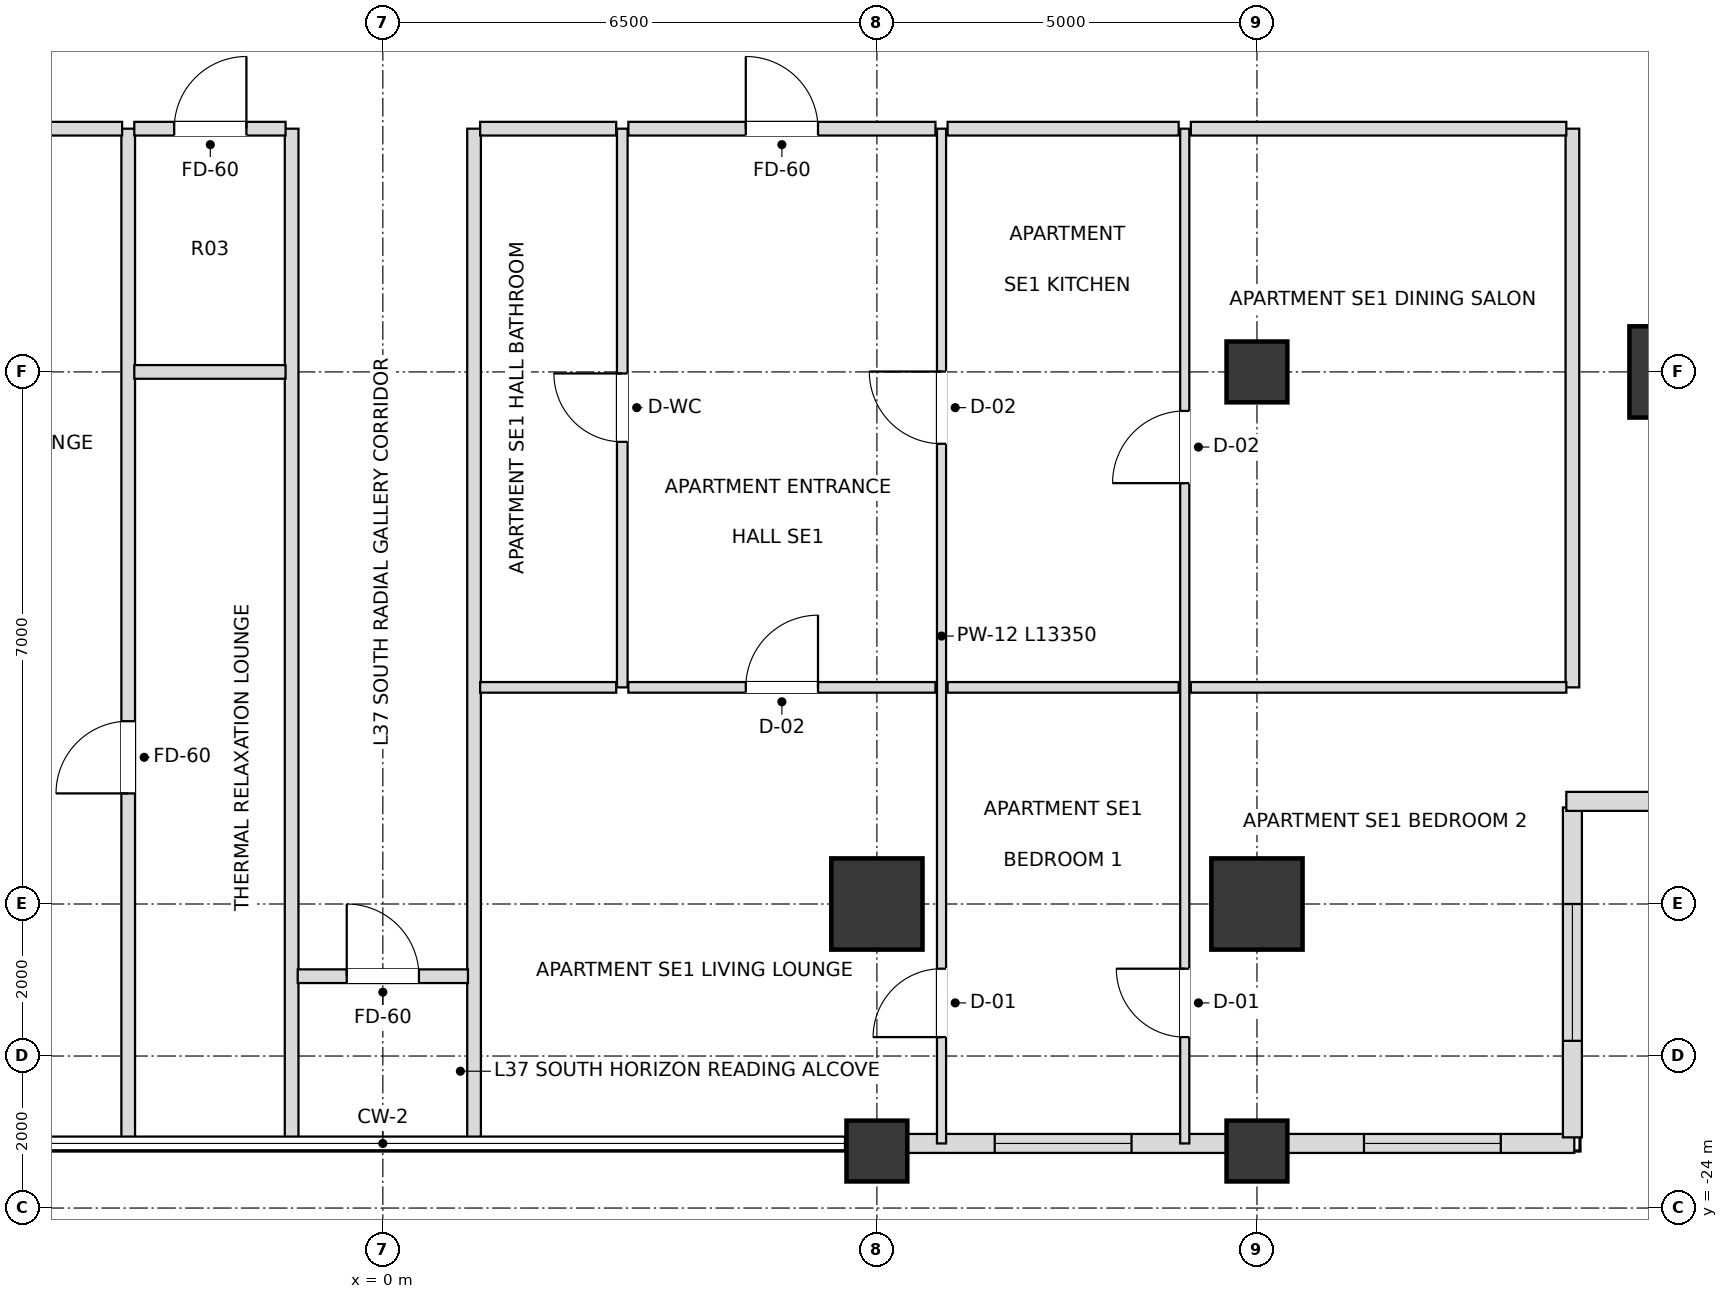
"""IFC4 building model, lengths in metres.
Left out: names, types, materials, properties, quantities, classifications, styles, units other than length and angle.
Written with IfcOpenShell. Run it as: python <this file> out.ifc"""

import sys

from ifc_helpers import new_model, si_unit, direction, frame, frame_2d, origin, origin_2d, place, context, subcontext, project, spatial, rectangle, extrude, element, fill, save


model = new_model("IFC4")
c1 = context("Model", 3, precision=1e-05, world=origin(), true_north=direction((0.0, 1.0)))
c2 = subcontext(c1, "Body", "Model", "MODEL_VIEW")
j1 = project(units=[si_unit("LENGTHUNIT", "METRE"), si_unit("PLANEANGLEUNIT", "RADIAN")], contexts=[c1])
p1 = place(None, origin())
s1 = spatial("IfcSite", under=j1, at=p1, CompositionType="ELEMENT")
p2 = place(p1, origin())
s2 = spatial("IfcBuilding", under=s1, at=p2, CompositionType="ELEMENT")
p3 = place(p2, frame((0.0, 0.0, 147.6)))
s3 = spatial("IfcBuildingStorey", under=s2, at=p3, CompositionType="ELEMENT", Elevation=147.6)
for number, where, z_axis, x_axis in (
    (1, (6.5, -20.0, 0.0), (0.0, 0.0, 1.0), (1.0, 0.0, 0.0)),
    (2, (11.5, -20.0, 0.0), (0.0, 0.0, 1.0), (1.0, 0.0, 0.0)),
    (3, (17.0, -13.0, 0.0), (0.0, 0.0, 1.0), (1.0, 0.0, 0.0)),
):
    element("IfcColumn", number, at=place(p3, frame(where, z_axis=z_axis, x_axis=x_axis)), inside=s3, PredefinedType="USERDEFINED", context=c2, shape_type="SweptSolid", body=[
        extrude(rectangle(XDim=1.2, YDim=1.2, at=origin_2d()), origin(), (0.0, 0.0, 1.0), 3.6),
    ])
for number, where, z_axis, x_axis in (
    (4, (11.5, -13.0, 0.0), (0.0, 0.0, 1.0), (1.0, 0.0, 0.0)),
    (5, (6.5, -23.25, 0.0), (0.0, 0.0, 1.0), (1.0, 0.0, 0.0)),
    (6, (11.5, -23.25, 0.0), (0.0, 0.0, 1.0), (1.0, 0.0, 0.0)),
):
    element("IfcColumn", number, at=place(p3, frame(where, z_axis=z_axis, x_axis=x_axis)), inside=s3, PredefinedType="COLUMN", context=c2, shape_type="SweptSolid", body=[
        extrude(rectangle(XDim=0.8, YDim=0.8, at=origin_2d()), origin(), (0.0, 0.0, 1.0), 3.6),
    ])
p4 = place(p3, frame((6.895, -23.15, 0.0), z_axis=(0.0, 0.0, 1.0), x_axis=(1.0, 0.0, 0.0)))
e7 = element("IfcWall", 7, at=p4, inside=s3, PredefinedType="SOLIDWALL", context=c2, shape_type="SweptSolid", body=[
    extrude(rectangle(XDim=4.21, YDim=0.25, at=frame_2d((2.105, 0.0))), origin(), (0.0, 0.0, 1.0), 2.736),
])
p5 = place(p4, frame((1.155, 0.0, 0.72)))
e8 = element("IfcOpeningElement", 8, at=p5, cuts=e7, PredefinedType="OPENING", context=c2, shape_type="SweptSolid", body=[
    extrude(rectangle(XDim=1.8, YDim=1.68, at=frame_2d((0.9, 0.84))), frame((0.0, 0.135, 0.0), z_axis=(0.0, -1.0, 0.0), x_axis=(1.0, 0.0, 0.0)), (0.0, 0.0, 1.0), 0.27),
])
p6 = place(p3, frame((11.895, -23.15, 0.0), z_axis=(0.0, 0.0, 1.0), x_axis=(1.0, 0.0, 0.0)))
e9 = element("IfcWall", 9, at=p6, inside=s3, PredefinedType="SOLIDWALL", context=c2, shape_type="SweptSolid", body=[
    extrude(rectangle(XDim=3.78, YDim=0.25, at=frame_2d((1.89, 0.0))), origin(), (0.0, 0.0, 1.0), 2.736),
])
p7 = place(p6, frame((1.013, 0.0, 0.72)))
e10 = element("IfcOpeningElement", 10, at=p7, cuts=e9, PredefinedType="OPENING", context=c2, shape_type="SweptSolid", body=[
    extrude(rectangle(XDim=1.8, YDim=1.68, at=frame_2d((0.9, 0.84))), frame((0.0, 0.135, 0.0), z_axis=(0.0, -1.0, 0.0), x_axis=(1.0, 0.0, 0.0)), (0.0, 0.0, 1.0), 0.27),
])
p8 = place(p3, frame((15.65, -23.07, 0.0), z_axis=(0.0, 0.0, 1.0), x_axis=(0.0, 1.0, 0.0)))
e11 = element("IfcWall", 11, at=p8, inside=s3, PredefinedType="SOLIDWALL", context=c2, shape_type="SweptSolid", body=[
    extrude(rectangle(XDim=4.34, YDim=0.25, at=frame_2d((2.17, 0.0))), origin(), (0.0, 0.0, 1.0), 2.736),
])
p9 = place(p8, frame((1.27, 0.0, 0.72)))
e12 = element("IfcOpeningElement", 12, at=p9, cuts=e11, PredefinedType="OPENING", context=c2, shape_type="SweptSolid", body=[
    extrude(rectangle(XDim=1.8, YDim=1.68, at=frame_2d((0.9, 0.84))), frame((0.0, 0.135, 0.0), z_axis=(0.0, -1.0, 0.0), x_axis=(1.0, 0.0, 0.0)), (0.0, 0.0, 1.0), 0.27),
])
p10 = place(p3, frame((15.57, -18.65, 0.0), z_axis=(0.0, 0.0, 1.0), x_axis=(1.0, 0.0, 0.0)))
e13 = element("IfcWall", 13, at=p10, inside=s3, PredefinedType="SOLIDWALL", context=c2, shape_type="SweptSolid", body=[
    extrude(rectangle(XDim=4.66, YDim=0.25, at=frame_2d((2.33, 0.0))), origin(), (0.0, 0.0, 1.0), 2.736),
])
p11 = place(p10, frame((1.43, 0.0, 0.72)))
e14 = element("IfcOpeningElement", 14, at=p11, cuts=e13, PredefinedType="OPENING", context=c2, shape_type="SweptSolid", body=[
    extrude(rectangle(XDim=1.8, YDim=1.68, at=frame_2d((0.9, 0.84))), frame((0.0, 0.135, 0.0), z_axis=(0.0, -1.0, 0.0), x_axis=(1.0, 0.0, 0.0)), (0.0, 0.0, 1.0), 0.27),
])
p12 = place(p3, frame((-3.35, -23.15, 0.0), z_axis=(0.0, 0.0, 1.0), x_axis=(0.0, 1.0, 0.0)))
e15 = element("IfcWall", 15, at=p12, inside=s3, PredefinedType="PARTITIONING", context=c2, shape_type="SweptSolid", body=[
    extrude(rectangle(XDim=13.35, YDim=0.18, at=frame_2d((6.675, 0.0))), origin(), (0.0, 0.0, 1.0), 2.816),
])
p13 = place(p12, frame((4.605, 0.0, 0.0)))
e16 = element("IfcOpeningElement", 16, at=p13, cuts=e15, PredefinedType="OPENING", context=c2, shape_type="SweptSolid", body=[
    extrude(rectangle(XDim=0.95, YDim=2.15, at=frame_2d((0.475, 1.075))), frame((0.0, 0.1, 0.0), z_axis=(0.0, -1.0, 0.0), x_axis=(1.0, 0.0, 0.0)), (0.0, 0.0, 1.0), 0.2),
])
for number, where, z_axis, x_axis in (
    (17, (-1.2, -23.15, 0.0), (0.0, 0.0, 1.0), (0.0, 1.0, 0.0)),
    (18, (1.2, -23.15, 0.0), (0.0, 0.0, 1.0), (0.0, 1.0, 0.0)),
):
    element("IfcWall", number, at=place(p3, frame(where, z_axis=z_axis, x_axis=x_axis)), inside=s3, PredefinedType="PARTITIONING", context=c2, shape_type="SweptSolid", body=[
        extrude(rectangle(XDim=13.35, YDim=0.18, at=frame_2d((6.675, 0.0))), origin(), (0.0, 0.0, 1.0), 2.816),
    ])
p14 = place(p3, frame((3.15, -17.15, 0.0), z_axis=(0.0, 0.0, 1.0), x_axis=(0.0, 1.0, 0.0)))
e19 = element("IfcWall", 19, at=p14, inside=s3, PredefinedType="PARTITIONING", context=c2, shape_type="SweptSolid", body=[
    extrude(rectangle(XDim=7.35, YDim=0.14, at=frame_2d((3.675, 0.0))), origin(), (0.0, 0.0, 1.0), 3.38),
])
p15 = place(p14, frame((3.23, 0.0, 0.0)))
e20 = element("IfcOpeningElement", 20, at=p15, cuts=e19, PredefinedType="OPENING", context=c2, shape_type="SweptSolid", body=[
    extrude(rectangle(XDim=0.9, YDim=2.1, at=frame_2d((0.45, 1.05))), frame((0.0, 0.08, 0.0), z_axis=(0.0, -1.0, 0.0), x_axis=(1.0, 0.0, 0.0)), (0.0, 0.0, 1.0), 0.16),
])
p16 = place(p3, frame((7.35, -23.15, 0.0), z_axis=(0.0, 0.0, 1.0), x_axis=(0.0, 1.0, 0.0)))
e21 = element("IfcWall", 21, at=p16, inside=s3, PredefinedType="PARTITIONING", context=c2, shape_type="SweptSolid", body=[
    extrude(rectangle(XDim=13.35, YDim=0.12, at=frame_2d((6.675, 0.0))), origin(), (0.0, 0.0, 1.0), 2.816),
])
p17 = place(p16, frame((9.205, 0.0, 0.0)))
e22 = element("IfcOpeningElement", 22, at=p17, cuts=e21, PredefinedType="OPENING", context=c2, shape_type="SweptSolid", body=[
    extrude(rectangle(XDim=0.95, YDim=2.1, at=frame_2d((0.475, 1.05))), frame((0.0, 0.07, 0.0), z_axis=(0.0, -1.0, 0.0), x_axis=(1.0, 0.0, 0.0)), (0.0, 0.0, 1.0), 0.14),
])
p18 = place(p16, frame((1.399, 0.0, 0.0)))
e23 = element("IfcOpeningElement", 23, at=p18, cuts=e21, PredefinedType="OPENING", context=c2, shape_type="SweptSolid", body=[
    extrude(rectangle(XDim=0.9, YDim=2.1, at=frame_2d((0.45, 1.05))), frame((0.0, 0.07, 0.0), z_axis=(0.0, -1.0, 0.0), x_axis=(1.0, 0.0, 0.0)), (0.0, 0.0, 1.0), 0.14),
])
p19 = place(p3, frame((10.55, -23.15, 0.0), z_axis=(0.0, 0.0, 1.0), x_axis=(0.0, 1.0, 0.0)))
e24 = element("IfcWall", 24, at=p19, inside=s3, PredefinedType="PARTITIONING", context=c2, shape_type="SweptSolid", body=[
    extrude(rectangle(XDim=13.35, YDim=0.12, at=frame_2d((6.675, 0.0))), origin(), (0.0, 0.0, 1.0), 2.816),
])
p20 = place(p19, frame((8.687, 0.0, 0.0)))
e25 = element("IfcOpeningElement", 25, at=p20, cuts=e24, PredefinedType="OPENING", context=c2, shape_type="SweptSolid", body=[
    extrude(rectangle(XDim=0.95, YDim=2.1, at=frame_2d((0.475, 1.05))), frame((0.0, 0.07, 0.0), z_axis=(0.0, -1.0, 0.0), x_axis=(1.0, 0.0, 0.0)), (0.0, 0.0, 1.0), 0.14),
])
p21 = place(p19, frame((1.399, 0.0, 0.0)))
e26 = element("IfcOpeningElement", 26, at=p21, cuts=e24, PredefinedType="OPENING", context=c2, shape_type="SweptSolid", body=[
    extrude(rectangle(XDim=0.9, YDim=2.1, at=frame_2d((0.45, 1.05))), frame((0.0, 0.07, 0.0), z_axis=(0.0, -1.0, 0.0), x_axis=(1.0, 0.0, 0.0)), (0.0, 0.0, 1.0), 0.14),
])
p22 = place(p3, frame((15.65, -17.15, 0.0), z_axis=(0.0, 0.0, 1.0), x_axis=(0.0, 1.0, 0.0)))
e27 = element("IfcWall", 27, at=p22, inside=s3, PredefinedType="PARTITIONING", context=c2, shape_type="SweptSolid", body=[
    extrude(rectangle(XDim=7.35, YDim=0.18, at=frame_2d((3.675, 0.0))), origin(), (0.0, 0.0, 1.0), 2.736),
])
p23 = place(p3, frame((-1.12, -20.95, 0.0), z_axis=(0.0, 0.0, 1.0), x_axis=(1.0, 0.0, 0.0)))
e28 = element("IfcWall", 28, at=p23, inside=s3, PredefinedType="PARTITIONING", context=c2, shape_type="SweptSolid", body=[
    extrude(rectangle(XDim=2.24, YDim=0.18, at=frame_2d((1.12, 0.0))), origin(), (0.0, 0.0, 1.0), 3.38),
])
p24 = place(p23, frame((0.645, 0.0, 0.0)))
e29 = element("IfcOpeningElement", 29, at=p24, cuts=e28, PredefinedType="OPENING", context=c2, shape_type="SweptSolid", body=[
    extrude(rectangle(XDim=0.95, YDim=2.15, at=frame_2d((0.475, 1.075))), frame((0.0, 0.1, 0.0), z_axis=(0.0, -1.0, 0.0), x_axis=(1.0, 0.0, 0.0)), (0.0, 0.0, 1.0), 0.2),
])
p25 = place(p3, frame((1.28, -17.15, 0.0), z_axis=(0.0, 0.0, 1.0), x_axis=(1.0, 0.0, 0.0)))
e30 = element("IfcWall", 30, at=p25, inside=s3, PredefinedType="PARTITIONING", context=c2, shape_type="SweptSolid", body=[
    extrude(rectangle(XDim=1.79, YDim=0.14, at=frame_2d((0.895, 0.0))), origin(), (0.0, 0.0, 1.0), 3.38),
])
p26 = place(p3, frame((3.23, -17.15, 0.0), z_axis=(0.0, 0.0, 1.0), x_axis=(1.0, 0.0, 0.0)))
e31 = element("IfcWall", 31, at=p26, inside=s3, PredefinedType="PARTITIONING", context=c2, shape_type="SweptSolid", body=[
    extrude(rectangle(XDim=4.04, YDim=0.14, at=frame_2d((2.02, 0.0))), origin(), (0.0, 0.0, 1.0), 2.816),
])
p27 = place(p26, frame((1.545, 0.0, 0.0)))
e32 = element("IfcOpeningElement", 32, at=p27, cuts=e31, PredefinedType="OPENING", context=c2, shape_type="SweptSolid", body=[
    extrude(rectangle(XDim=0.95, YDim=2.1, at=frame_2d((0.475, 1.05))), frame((0.0, 0.08, 0.0), z_axis=(0.0, -1.0, 0.0), x_axis=(1.0, 0.0, 0.0)), (0.0, 0.0, 1.0), 0.16),
])
p28 = place(p3, frame((7.43, -17.15, 0.0), z_axis=(0.0, 0.0, 1.0), x_axis=(1.0, 0.0, 0.0)))
e33 = element("IfcWall", 33, at=p28, inside=s3, PredefinedType="PARTITIONING", context=c2, shape_type="SweptSolid", body=[
    extrude(rectangle(XDim=3.04, YDim=0.14, at=frame_2d((1.52, 0.0))), origin(), (0.0, 0.0, 1.0), 3.38),
])
p29 = place(p3, frame((10.63, -17.15, 0.0), z_axis=(0.0, 0.0, 1.0), x_axis=(1.0, 0.0, 0.0)))
e34 = element("IfcWall", 34, at=p29, inside=s3, PredefinedType="PARTITIONING", context=c2, shape_type="SweptSolid", body=[
    extrude(rectangle(XDim=4.94, YDim=0.14, at=frame_2d((2.47, 0.0))), origin(), (0.0, 0.0, 1.0), 2.736),
])
p30 = place(p3, frame((-3.27, -13.0, 0.0), z_axis=(0.0, 0.0, 1.0), x_axis=(1.0, 0.0, 0.0)))
e35 = element("IfcWall", 35, at=p30, inside=s3, PredefinedType="PARTITIONING", context=c2, shape_type="SweptSolid", body=[
    extrude(rectangle(XDim=1.99, YDim=0.18, at=frame_2d((0.995, 0.0))), origin(), (0.0, 0.0, 1.0), 3.38),
])
p31 = place(p3, frame((-10.07, -9.8, 0.0), z_axis=(0.0, 0.0, 1.0), x_axis=(1.0, 0.0, 0.0)))
e36 = element("IfcWall", 36, at=p31, inside=s3, PredefinedType="PARTITIONING", context=c2, shape_type="SweptSolid", body=[
    extrude(rectangle(XDim=6.64, YDim=0.18, at=frame_2d((3.32, 0.0))), origin(), (0.0, 0.0, 1.0), 2.816),
])
p32 = place(p31, frame((2.845, 0.0, 0.0)))
e37 = element("IfcOpeningElement", 37, at=p32, cuts=e36, PredefinedType="OPENING", context=c2, shape_type="SweptSolid", body=[
    extrude(rectangle(XDim=0.95, YDim=2.15, at=frame_2d((0.475, 1.075))), frame((0.0, 0.1, 0.0), z_axis=(0.0, -1.0, 0.0), x_axis=(1.0, 0.0, 0.0)), (0.0, 0.0, 1.0), 0.2),
])
p33 = place(p3, frame((-3.27, -9.8, 0.0), z_axis=(0.0, 0.0, 1.0), x_axis=(1.0, 0.0, 0.0)))
e38 = element("IfcWall", 38, at=p33, inside=s3, PredefinedType="PARTITIONING", context=c2, shape_type="SweptSolid", body=[
    extrude(rectangle(XDim=1.99, YDim=0.18, at=frame_2d((0.995, 0.0))), origin(), (0.0, 0.0, 1.0), 3.38),
])
p34 = place(p33, frame((0.525, 0.0, 0.0)))
e39 = element("IfcOpeningElement", 39, at=p34, cuts=e38, PredefinedType="OPENING", context=c2, shape_type="SweptSolid", body=[
    extrude(rectangle(XDim=0.95, YDim=2.15, at=frame_2d((0.475, 1.075))), frame((0.0, 0.1, 0.0), z_axis=(0.0, -1.0, 0.0), x_axis=(1.0, 0.0, 0.0)), (0.0, 0.0, 1.0), 0.2),
])
p35 = place(p3, frame((1.28, -9.8, 0.0), z_axis=(0.0, 0.0, 1.0), x_axis=(1.0, 0.0, 0.0)))
e40 = element("IfcWall", 40, at=p35, inside=s3, PredefinedType="PARTITIONING", context=c2, shape_type="SweptSolid", body=[
    extrude(rectangle(XDim=1.79, YDim=0.18, at=frame_2d((0.895, 0.0))), origin(), (0.0, 0.0, 1.0), 3.38),
])
p36 = place(p3, frame((3.23, -9.8, 0.0), z_axis=(0.0, 0.0, 1.0), x_axis=(1.0, 0.0, 0.0)))
e41 = element("IfcWall", 41, at=p36, inside=s3, PredefinedType="PARTITIONING", context=c2, shape_type="SweptSolid", body=[
    extrude(rectangle(XDim=4.04, YDim=0.18, at=frame_2d((2.02, 0.0))), origin(), (0.0, 0.0, 1.0), 2.816),
])
p37 = place(p36, frame((1.545, 0.0, 0.0)))
e42 = element("IfcOpeningElement", 42, at=p37, cuts=e41, PredefinedType="OPENING", context=c2, shape_type="SweptSolid", body=[
    extrude(rectangle(XDim=0.95, YDim=2.15, at=frame_2d((0.475, 1.075))), frame((0.0, 0.1, 0.0), z_axis=(0.0, -1.0, 0.0), x_axis=(1.0, 0.0, 0.0)), (0.0, 0.0, 1.0), 0.2),
])
p38 = place(p3, frame((7.43, -9.8, 0.0), z_axis=(0.0, 0.0, 1.0), x_axis=(1.0, 0.0, 0.0)))
e43 = element("IfcWall", 43, at=p38, inside=s3, PredefinedType="PARTITIONING", context=c2, shape_type="SweptSolid", body=[
    extrude(rectangle(XDim=3.04, YDim=0.18, at=frame_2d((1.52, 0.0))), origin(), (0.0, 0.0, 1.0), 3.38),
])
p39 = place(p3, frame((10.63, -9.8, 0.0), z_axis=(0.0, 0.0, 1.0), x_axis=(1.0, 0.0, 0.0)))
e44 = element("IfcWall", 44, at=p39, inside=s3, PredefinedType="PARTITIONING", context=c2, shape_type="SweptSolid", body=[
    extrude(rectangle(XDim=4.94, YDim=0.18, at=frame_2d((2.47, 0.0))), origin(), (0.0, 0.0, 1.0), 3.38),
])
p40 = place(p5, origin())
e45 = element("IfcWindow", 45, at=p40, inside=s3, PartitioningType="SINGLE_PANEL", PredefinedType="WINDOW", context=c2, shape_type="SweptSolid", body=[
    extrude(rectangle(XDim=1.8, YDim=1.68, at=frame_2d((0.9, 0.84))), frame((0.0, 0.03, 0.0), z_axis=(0.0, -1.0, 0.0), x_axis=(1.0, 0.0, 0.0)), (0.0, 0.0, 1.0), 0.06),
])
fill(e8, e45)
p41 = place(p7, origin())
e46 = element("IfcWindow", 46, at=p41, inside=s3, PartitioningType="SINGLE_PANEL", PredefinedType="WINDOW", context=c2, shape_type="SweptSolid", body=[
    extrude(rectangle(XDim=1.8, YDim=1.68, at=frame_2d((0.9, 0.84))), frame((0.0, 0.03, 0.0), z_axis=(0.0, -1.0, 0.0), x_axis=(1.0, 0.0, 0.0)), (0.0, 0.0, 1.0), 0.06),
])
fill(e10, e46)
p42 = place(p9, origin())
e47 = element("IfcWindow", 47, at=p42, inside=s3, PartitioningType="SINGLE_PANEL", PredefinedType="WINDOW", context=c2, shape_type="SweptSolid", body=[
    extrude(rectangle(XDim=1.8, YDim=1.68, at=frame_2d((0.9, 0.84))), frame((0.0, 0.03, 0.0), z_axis=(0.0, -1.0, 0.0), x_axis=(1.0, 0.0, 0.0)), (0.0, 0.0, 1.0), 0.06),
])
fill(e12, e47)
p43 = place(p24, origin())
e48 = element("IfcDoor", 48, at=p43, inside=s3, OperationType="SINGLE_SWING_LEFT", PredefinedType="DOOR", context=c2, shape_type="SweptSolid", body=[
    extrude(rectangle(XDim=0.95, YDim=2.15, at=frame_2d((0.475, 1.075))), frame((0.0, 0.025, 0.0), z_axis=(0.0, -1.0, 0.0), x_axis=(1.0, 0.0, 0.0)), (0.0, 0.0, 1.0), 0.05),
])
fill(e29, e48)
p44 = place(p34, origin())
e49 = element("IfcDoor", 49, at=p44, inside=s3, OperationType="SINGLE_SWING_RIGHT", PredefinedType="DOOR", context=c2, shape_type="SweptSolid", body=[
    extrude(rectangle(XDim=0.95, YDim=2.15, at=frame_2d((0.475, 1.075))), frame((0.0, 0.025, 0.0), z_axis=(0.0, -1.0, 0.0), x_axis=(1.0, 0.0, 0.0)), (0.0, 0.0, 1.0), 0.05),
])
fill(e39, e49)
p45 = place(p13, origin())
e50 = element("IfcDoor", 50, at=p45, inside=s3, OperationType="SINGLE_SWING_LEFT", PredefinedType="DOOR", context=c2, shape_type="SweptSolid", body=[
    extrude(rectangle(XDim=0.95, YDim=2.15, at=frame_2d((0.475, 1.075))), frame((0.0, 0.025, 0.0), z_axis=(0.0, -1.0, 0.0), x_axis=(1.0, 0.0, 0.0)), (0.0, 0.0, 1.0), 0.05),
])
fill(e16, e50)
p46 = place(p15, origin())
e51 = element("IfcDoor", 51, at=p46, inside=s3, OperationType="SINGLE_SWING_RIGHT", PredefinedType="DOOR", context=c2, shape_type="SweptSolid", body=[
    extrude(rectangle(XDim=0.9, YDim=2.1, at=frame_2d((0.45, 1.05))), frame((0.0, 0.025, 0.0), z_axis=(0.0, -1.0, 0.0), x_axis=(1.0, 0.0, 0.0)), (0.0, 0.0, 1.0), 0.05),
])
fill(e20, e51)
p47 = place(p37, origin())
e52 = element("IfcDoor", 52, at=p47, inside=s3, OperationType="SINGLE_SWING_LEFT", PredefinedType="DOOR", context=c2, shape_type="SweptSolid", body=[
    extrude(rectangle(XDim=0.95, YDim=2.15, at=frame_2d((0.475, 1.075))), frame((0.0, 0.025, 0.0), z_axis=(0.0, -1.0, 0.0), x_axis=(1.0, 0.0, 0.0)), (0.0, 0.0, 1.0), 0.05),
])
fill(e42, e52)
p48 = place(p17, origin())
e53 = element("IfcDoor", 53, at=p48, inside=s3, OperationType="SINGLE_SWING_RIGHT", PredefinedType="DOOR", context=c2, shape_type="SweptSolid", body=[
    extrude(rectangle(XDim=0.95, YDim=2.1, at=frame_2d((0.475, 1.05))), frame((0.0, 0.025, 0.0), z_axis=(0.0, -1.0, 0.0), x_axis=(1.0, 0.0, 0.0)), (0.0, 0.0, 1.0), 0.05),
])
fill(e22, e53)
p49 = place(p20, origin())
e54 = element("IfcDoor", 54, at=p49, inside=s3, OperationType="SINGLE_SWING_LEFT", PredefinedType="DOOR", context=c2, shape_type="SweptSolid", body=[
    extrude(rectangle(XDim=0.95, YDim=2.1, at=frame_2d((0.475, 1.05))), frame((0.0, 0.025, 0.0), z_axis=(0.0, -1.0, 0.0), x_axis=(1.0, 0.0, 0.0)), (0.0, 0.0, 1.0), 0.05),
])
fill(e25, e54)
p50 = place(p27, origin())
e55 = element("IfcDoor", 55, at=p50, inside=s3, OperationType="SINGLE_SWING_RIGHT", PredefinedType="DOOR", context=c2, shape_type="SweptSolid", body=[
    extrude(rectangle(XDim=0.95, YDim=2.1, at=frame_2d((0.475, 1.05))), frame((0.0, 0.025, 0.0), z_axis=(0.0, -1.0, 0.0), x_axis=(1.0, 0.0, 0.0)), (0.0, 0.0, 1.0), 0.05),
])
fill(e32, e55)
p51 = place(p18, origin())
e56 = element("IfcDoor", 56, at=p51, inside=s3, OperationType="SINGLE_SWING_LEFT", PredefinedType="DOOR", context=c2, shape_type="SweptSolid", body=[
    extrude(rectangle(XDim=0.9, YDim=2.1, at=frame_2d((0.45, 1.05))), frame((0.0, 0.025, 0.0), z_axis=(0.0, -1.0, 0.0), x_axis=(1.0, 0.0, 0.0)), (0.0, 0.0, 1.0), 0.05),
])
fill(e23, e56)
p52 = place(p21, origin())
e57 = element("IfcDoor", 57, at=p52, inside=s3, OperationType="SINGLE_SWING_RIGHT", PredefinedType="DOOR", context=c2, shape_type="SweptSolid", body=[
    extrude(rectangle(XDim=0.9, YDim=2.1, at=frame_2d((0.45, 1.05))), frame((0.0, 0.025, 0.0), z_axis=(0.0, -1.0, 0.0), x_axis=(1.0, 0.0, 0.0)), (0.0, 0.0, 1.0), 0.05),
])
fill(e26, e57)
save(model, sys.argv[1])
